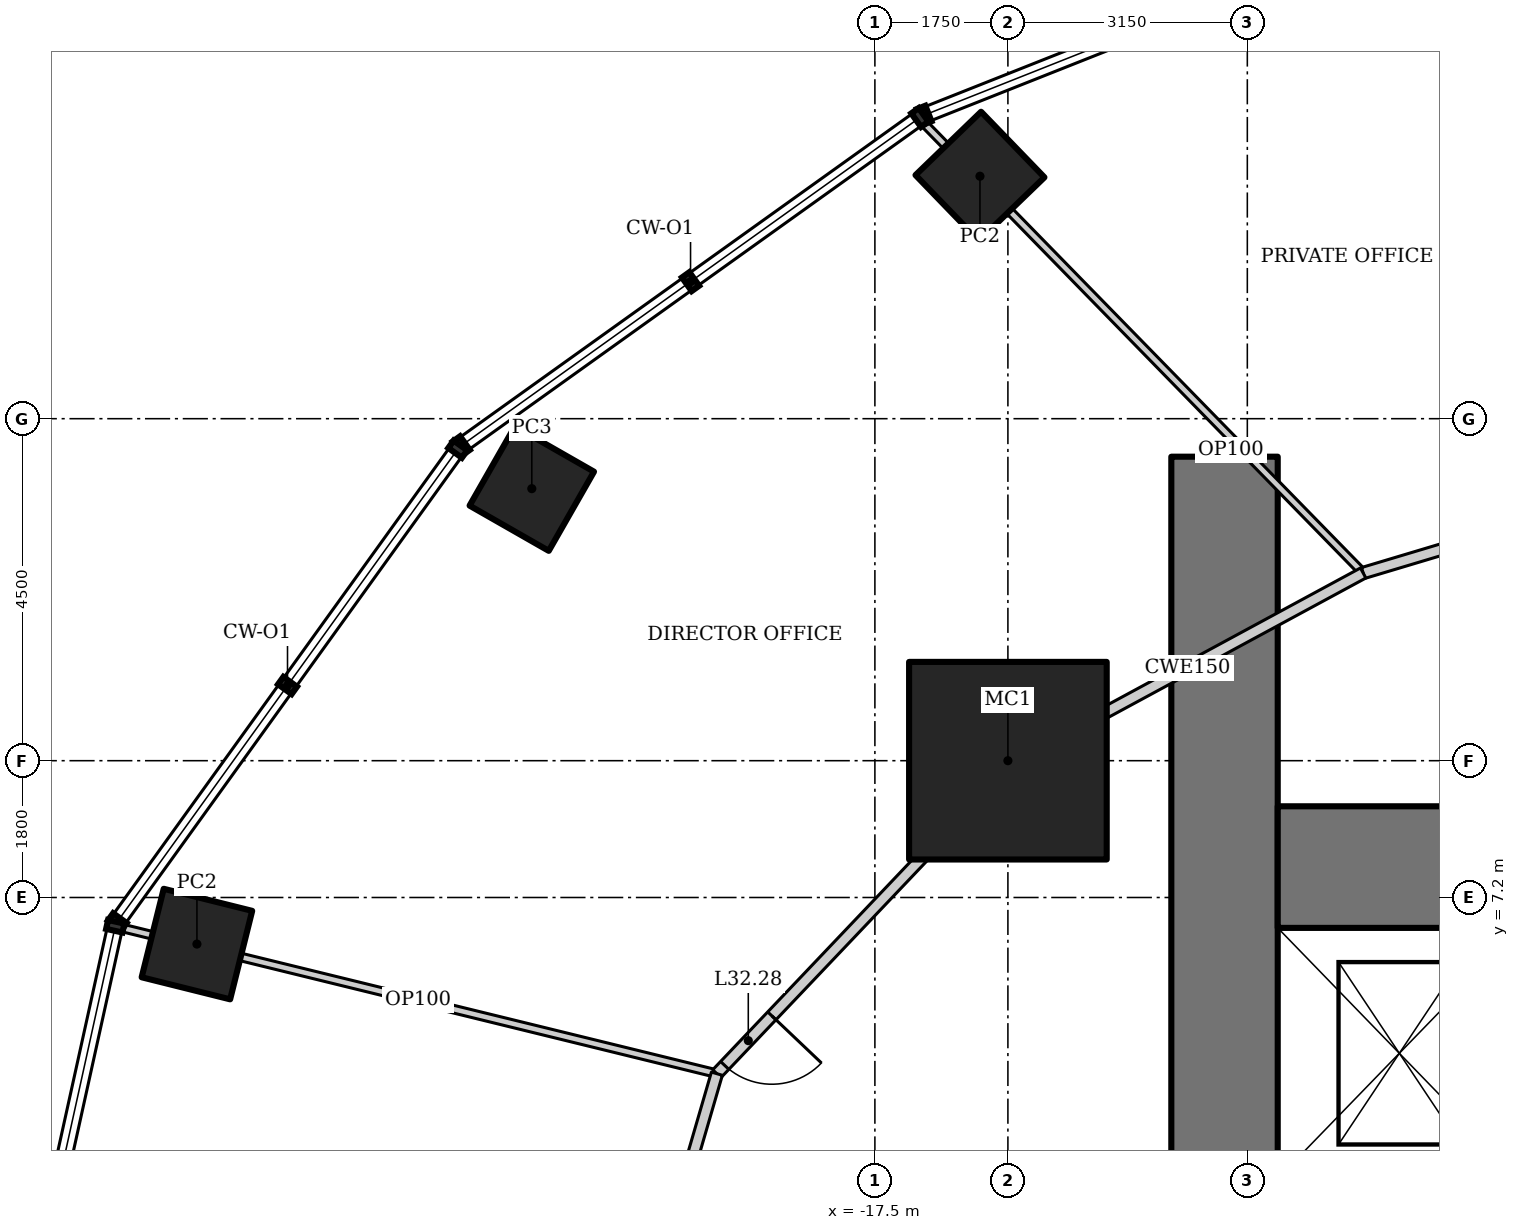
"""IFC4 building model, lengths in metres.
Left out: names, types, materials, properties, quantities, classifications, styles, units other than length and angle.
Written with IfcOpenShell. Run it as: python <this file> out.ifc"""

import sys

from ifc_helpers import new_model, si_unit, direction, frame, frame_2d, origin, origin_2d, place, context, subcontext, project, spatial, rectangle, hollow_rectangle, extrude, element, fill, save


model = new_model("IFC4")
c1 = context("Model", 3, precision=1e-05, world=origin(), true_north=direction((0.0, 1.0)))
c2 = subcontext(c1, "Body", "Model", "MODEL_VIEW")
j1 = project(units=[si_unit("LENGTHUNIT", "METRE"), si_unit("PLANEANGLEUNIT", "RADIAN")], contexts=[c1])
p1 = place(None, origin())
s1 = spatial("IfcSite", under=j1, at=p1, CompositionType="ELEMENT")
p2 = place(p1, origin())
s2 = spatial("IfcBuilding", under=s1, at=p2, CompositionType="ELEMENT")
p3 = place(p2, frame((0.0, 0.0, 138.4)))
s3 = spatial("IfcBuildingStorey", under=s2, at=p3, CompositionType="ELEMENT", Elevation=138.4)
p4 = place(p3, frame((-15.75, 9.0, 0.0), z_axis=(0.0, 0.0, 1.0), x_axis=(1.0, 0.0, 0.0)))
e1 = element("IfcColumn", 1, at=p4, inside=s3, PredefinedType="COLUMN", context=c2, shape_type="SweptSolid", body=[
    extrude(hollow_rectangle(XDim=2.6, YDim=2.6, WallThickness=0.13, at=origin_2d()), origin(), (0.0, 0.0, 1.0), 4.2),
])
for number, where, z_axis, x_axis in (
    (2, (-9.749, 19.133, 0.0), (0.0, 0.0, 1.0), (0.891, 0.454, 0.0)),
    (3, (-16.118, 16.69, 0.0), (0.0, 0.0, 1.0), (0.719, 0.695, 0.0)),
):
    element("IfcColumn", number, at=place(p3, frame(where, z_axis=z_axis, x_axis=x_axis)), inside=s3, PredefinedType="COLUMN", context=c2, shape_type="SweptSolid", body=[
        extrude(hollow_rectangle(XDim=1.2, YDim=1.2, WallThickness=0.1, at=origin_2d()), origin(), (0.0, 0.0, 1.0), 4.2),
    ])
p5 = place(p3, frame((-22.014, 12.579, 0.0), z_axis=(0.0, 0.0, 1.0), x_axis=(0.496139221777, 0.86824298017, 0.0)))
e4 = element("IfcColumn", 4, at=p5, inside=s3, PredefinedType="COLUMN", context=c2, shape_type="SweptSolid", body=[
    extrude(hollow_rectangle(XDim=1.2, YDim=1.2, WallThickness=0.12, at=origin_2d()), origin(), (0.0, 0.0, 1.0), 4.2),
])
p6 = place(p3, frame((-26.42, 6.587, 0.0), z_axis=(0.0, 0.0, 1.0), x_axis=(0.2419218956, 0.970295726276, 0.0)))
e5 = element("IfcColumn", 5, at=p6, inside=s3, PredefinedType="COLUMN", context=c2, shape_type="SweptSolid", body=[
    extrude(hollow_rectangle(XDim=1.2, YDim=1.2, WallThickness=0.1, at=origin_2d()), origin(), (0.0, 0.0, 1.0), 4.2),
])
p7 = place(p3, frame((-12.9, 13.0, 0.0), z_axis=(0.0, 0.0, 1.0), x_axis=(0.0, -1.0, 0.0)))
e6 = element("IfcWall", 6, at=p7, inside=s3, PredefinedType="SHEAR", context=c2, shape_type="SweptSolid", body=[
    extrude(rectangle(XDim=26.0, YDim=1.4, at=frame_2d((13.0, 0.0))), origin(), (0.0, 0.0, 1.0), 4.2),
])
p8 = place(p7, frame((12.1, 0.0, 0.0)))
e7 = element("IfcOpeningElement", 7, at=p8, cuts=e6, PredefinedType="OPENING", context=c2, shape_type="SweptSolid", body=[
    extrude(rectangle(XDim=1.8, YDim=2.1, at=frame_2d((0.9, 1.05))), frame((0.0, 0.71, 0.0), z_axis=(0.0, -1.0, 0.0), x_axis=(1.0, 0.0, 0.0)), (0.0, 0.0, 1.0), 1.42),
])
p9 = place(p3, frame((12.2, 7.6, 0.0), z_axis=(0.0, 0.0, 1.0), x_axis=(-1.0, 0.0, 0.0)))
e8 = element("IfcWall", 8, at=p9, inside=s3, PredefinedType="SHEAR", context=c2, shape_type="SweptSolid", body=[
    extrude(rectangle(XDim=24.4, YDim=1.6, at=frame_2d((12.2, 0.0))), origin(), (0.0, 0.0, 1.0), 4.2),
])
p10 = place(p3, frame((-10.253, 20.052, 0.0), z_axis=(0.0, 0.0, 1.0), x_axis=(0.457535449567, -0.889191381194, 0.0)))
e9 = element("IfcWall", 9, at=p10, inside=s3, PredefinedType="PARTITIONING", context=c2, shape_type="SweptSolid", body=[
    extrude(rectangle(XDim=8.123, YDim=0.1, at=frame_2d((4.061, 0.0))), origin(), (0.0, 0.0, 1.0), 3.349),
])
p11 = place(p3, frame((-16.882, 17.414, 0.0), z_axis=(0.0, 0.0, 1.0), x_axis=(0.698758056249, -0.715358077348, 0.0)))
e10 = element("IfcWall", 10, at=p11, inside=s3, PredefinedType="PARTITIONING", context=c2, shape_type="SweptSolid", body=[
    extrude(rectangle(XDim=8.31, YDim=0.1, at=frame_2d((4.155, 0.0))), origin(), (0.0, 0.0, 1.0), 3.321),
])
p12 = place(p3, frame((-27.441, 6.809, 0.0), z_axis=(0.0, 0.0, 1.0), x_axis=(0.971241251223, -0.238097526075, 0.0)))
e11 = element("IfcWall", 11, at=p12, inside=s3, PredefinedType="PARTITIONING", context=c2, shape_type="SweptSolid", body=[
    extrude(rectangle(XDim=8.094, YDim=0.1, at=frame_2d((4.047, 0.0))), origin(), (0.0, 0.0, 1.0), 3.113),
])
p13 = place(p3, frame((-6.537, 12.829, 0.0), z_axis=(0.0, 0.0, 1.0), x_axis=(-0.957933992798, -0.286988615527, 0.0)))
e12 = element("IfcWall", 12, at=p13, inside=s3, PredefinedType="PARTITIONING", context=c2, shape_type="SweptSolid", body=[
    extrude(rectangle(XDim=4.738, YDim=0.15, at=frame_2d((2.369, 0.0))), origin(), (0.0, 0.0, 1.0), 4.05),
])
p14 = place(p13, frame((1.607, 0.0, 0.0)))
e13 = element("IfcOpeningElement", 13, at=p14, cuts=e12, PredefinedType="OPENING", context=c2, shape_type="SweptSolid", body=[
    extrude(rectangle(XDim=0.9, YDim=2.1, at=frame_2d((0.45, 1.05))), frame((0.0, 0.085, 0.0), z_axis=(0.0, -1.0, 0.0), x_axis=(1.0, 0.0, 0.0)), (0.0, 0.0, 1.0), 0.17),
])
p15 = place(p3, frame((-11.076, 11.469, 0.0), z_axis=(0.0, 0.0, 1.0), x_axis=(-0.879436285334, -0.476016617397, 0.0)))
e14 = element("IfcWall", 14, at=p15, inside=s3, PredefinedType="PARTITIONING", context=c2, shape_type="SweptSolid", body=[
    extrude(rectangle(XDim=5.253, YDim=0.15, at=frame_2d((2.626, 0.0))), origin(), (0.0, 0.0, 1.0), 4.05),
])
p16 = place(p3, frame((-15.696, 8.969, 0.0), z_axis=(0.0, 0.0, 1.0), x_axis=(-0.688797257101, -0.72495402517, 0.0)))
e15 = element("IfcWall", 15, at=p16, inside=s3, PredefinedType="PARTITIONING", context=c2, shape_type="SweptSolid", body=[
    extrude(rectangle(XDim=5.638, YDim=0.15, at=frame_2d((2.819, 0.0))), origin(), (0.0, 0.0, 1.0), 4.05),
])
p17 = place(p16, frame((4.588, 0.0, 0.0)))
e16 = element("IfcOpeningElement", 16, at=p17, cuts=e15, PredefinedType="OPENING", context=c2, shape_type="SweptSolid", body=[
    extrude(rectangle(XDim=0.9, YDim=2.1, at=frame_2d((0.45, 1.05))), frame((0.0, 0.085, 0.0), z_axis=(0.0, -1.0, 0.0), x_axis=(1.0, 0.0, 0.0)), (0.0, 0.0, 1.0), 0.17),
])
p18 = place(p3, frame((-19.579, 4.882, 0.0), z_axis=(0.0, 0.0, 1.0), x_axis=(-0.279474430869, -0.960153134917, 0.0)))
e17 = element("IfcWall", 17, at=p18, inside=s3, PredefinedType="PARTITIONING", context=c2, shape_type="SweptSolid", body=[
    extrude(rectangle(XDim=5.084, YDim=0.15, at=frame_2d((2.542, 0.0))), origin(), (0.0, 0.0, 1.0), 4.05),
])
p19 = place(p3, frame((-12.9, 13.0, 0.0), z_axis=(0.0, 0.0, 1.0), x_axis=(0.714845300066, 0.699282630253, 0.0)))
e18 = element("IfcWall", 18, at=p19, inside=s3, PredefinedType="PARTITIONING", context=c2, shape_type="SweptSolid", body=[
    extrude(rectangle(XDim=0.235, YDim=0.1, at=frame_2d((0.118, 0.0))), origin(), (0.0, 0.0, 1.0), 4.05),
])
p20 = place(p17, origin())
e19 = element("IfcDoor", 19, at=p20, inside=s3, OperationType="SINGLE_SWING_LEFT", PredefinedType="DOOR", context=c2, shape_type="SweptSolid", body=[
    extrude(rectangle(XDim=0.9, YDim=2.1, at=frame_2d((0.45, 1.05))), frame((0.0, 0.025, 0.0), z_axis=(0.0, -1.0, 0.0), x_axis=(1.0, 0.0, 0.0)), (0.0, 0.0, 1.0), 0.05),
])
fill(e16, e19)
save(model, sys.argv[1])
